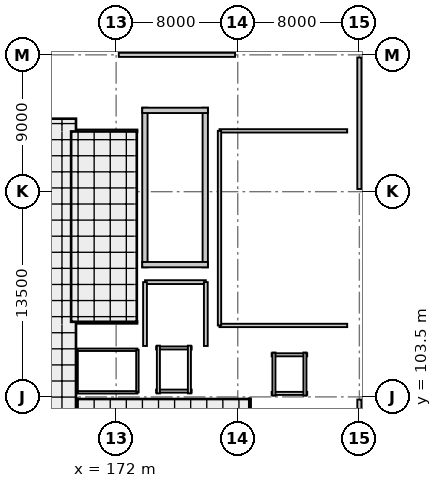
"""IFC4 building model, lengths in metres.
Left out: names, types, materials, properties, quantities, classifications, styles, units other than length and angle.
Written with IfcOpenShell. Run it as: python <this file> out.ifc"""

import sys

from ifc_helpers import new_model, si_unit, direction, frame, frame_2d, origin, origin_2d, place, context, subcontext, project, spatial, rectangle, i_section, extrude, element, fill, save


model = new_model("IFC4")
c1 = context("Model", 3, precision=1e-05, world=origin(), true_north=direction((0.0, 1.0)))
c2 = subcontext(c1, "Body", "Model", "MODEL_VIEW")
j1 = project(units=[si_unit("LENGTHUNIT", "METRE"), si_unit("PLANEANGLEUNIT", "RADIAN")], contexts=[c1])
p1 = place(None, origin())
s1 = spatial("IfcSite", under=j1, at=p1, CompositionType="ELEMENT")
p2 = place(p1, origin())
s2 = spatial("IfcBuilding", under=s1, at=p2, CompositionType="ELEMENT")
p3 = place(p2, frame((0.0, 0.0, 17.6)))
s3 = spatial("IfcBuildingStorey", under=s2, at=p3, CompositionType="ELEMENT", Elevation=17.6)
for number, where, z_axis, x_axis in (
    (1, (172.0, 103.5, 0.0), (0.0, 0.0, 1.0), (1.0, 0.0, 0.0)),
    (2, (172.0, 117.0, 0.0), (0.0, 0.0, 1.0), (1.0, 0.0, 0.0)),
    (3, (172.0, 126.0, 0.0), (0.0, 0.0, 1.0), (1.0, 0.0, 0.0)),
    (4, (180.0, 103.5, 0.0), (0.0, 0.0, 1.0), (1.0, 0.0, 0.0)),
    (5, (180.0, 117.0, 0.0), (0.0, 0.0, 1.0), (1.0, 0.0, 0.0)),
    (6, (180.0, 126.0, 0.0), (0.0, 0.0, 1.0), (1.0, 0.0, 0.0)),
    (7, (188.0, 103.5, 0.0), (0.0, 0.0, 1.0), (1.0, 0.0, 0.0)),
    (8, (188.0, 117.0, 0.0), (0.0, 0.0, 1.0), (1.0, 0.0, 0.0)),
    (9, (188.0, 126.0, 0.0), (0.0, 0.0, 1.0), (1.0, 0.0, 0.0)),
):
    element("IfcColumn", number, at=place(p3, frame(where, z_axis=z_axis, x_axis=x_axis)), inside=s3, PredefinedType="COLUMN", context=c2, shape_type="SweptSolid", body=[
        extrude(i_section(OverallWidth=0.35, OverallDepth=0.35, WebThickness=0.012, FlangeThickness=0.019, FilletRadius=0.02, at=origin_2d()), origin(), (0.0, 0.0, 1.0), 3.2),
    ])
p4 = place(p3, frame((172.175, 126.0, 0.0), z_axis=(0.0, 0.0, 1.0), x_axis=(1.0, 0.0, 0.0)))
e10 = element("IfcWall", 10, at=p4, inside=s3, PredefinedType="SOLIDWALL", context=c2, shape_type="SweptSolid", body=[
    extrude(rectangle(XDim=7.65, YDim=0.27, at=frame_2d((3.825, 0.0))), origin(), (0.0, 0.0, 1.0), 2.495),
])
p5 = place(p4, frame((3.25, 0.0, 0.9)))
e11 = element("IfcOpeningElement", 11, at=p5, cuts=e10, PredefinedType="OPENING", context=c2, shape_type="SweptSolid", body=[
    extrude(rectangle(XDim=1.15, YDim=1.45, at=frame_2d((0.575, 0.725))), frame((0.0, 0.145, 0.0), z_axis=(0.0, -1.0, 0.0), x_axis=(1.0, 0.0, 0.0)), (0.0, 0.0, 1.0), 0.29),
])
for number, where, z_axis, x_axis in (
    (12, (188.0, 103.325, 0.0), (0.0, 0.0, 1.0), (0.0, -1.0, 0.0)),
    (13, (188.0, 125.825, 0.0), (0.0, 0.0, 1.0), (0.0, -1.0, 0.0)),
):
    element("IfcWall", number, at=place(p3, frame(where, z_axis=z_axis, x_axis=x_axis)), inside=s3, PredefinedType="SOLIDWALL", context=c2, shape_type="SweptSolid", body=[
        extrude(rectangle(XDim=8.65, YDim=0.27, at=frame_2d((4.325, 0.0))), origin(), (0.0, 0.0, 1.0), 2.375),
    ])
for number, where, z_axis, x_axis in (
    (14, (177.863, 112.025, 0.0), (0.0, 0.0, 1.0), (0.0, 1.0, 0.0)),
    (15, (173.893, 122.522, 0.0), (0.0, 0.0, 1.0), (0.0, -1.0, 0.0)),
):
    element("IfcWall", number, at=place(p3, frame(where, z_axis=z_axis, x_axis=x_axis)), inside=s3, PredefinedType="SHEAR", context=c2, shape_type="SweptSolid", body=[
        extrude(rectangle(XDim=10.498, YDim=0.35, at=frame_2d((5.249, 0.0))), origin(), (0.0, 0.0, 1.0), 2.98),
    ])
p6 = place(p3, frame((178.038, 122.347, 0.0), z_axis=(0.0, 0.0, 1.0), x_axis=(-1.0, 0.0, 0.0)))
e16 = element("IfcWall", 16, at=p6, inside=s3, PredefinedType="SHEAR", context=c2, shape_type="SweptSolid", body=[
    extrude(rectangle(XDim=4.32, YDim=0.35, at=frame_2d((2.16, 0.0))), origin(), (0.0, 0.0, 1.0), 2.98),
])
p7 = place(p3, frame((173.718, 112.2, 0.0), z_axis=(0.0, 0.0, 1.0), x_axis=(1.0, 0.0, 0.0)))
e17 = element("IfcWall", 17, at=p7, inside=s3, PredefinedType="SHEAR", context=c2, shape_type="SweptSolid", body=[
    extrude(rectangle(XDim=4.32, YDim=0.35, at=frame_2d((2.16, 0.0))), origin(), (0.0, 0.0, 1.0), 2.98),
])
p8 = place(p7, frame((1.15, 0.0, 0.0)))
e18 = element("IfcOpeningElement", 18, at=p8, cuts=e17, PredefinedType="OPENING", context=c2, shape_type="SweptSolid", body=[
    extrude(rectangle(XDim=1.3, YDim=2.1, at=frame_2d((0.65, 1.05))), frame((0.0, 0.185, 0.0), z_axis=(0.0, -1.0, 0.0), x_axis=(1.0, 0.0, 0.0)), (0.0, 0.0, 1.0), 0.37),
])
p9 = place(p3, frame((174.63, 103.88, 0.0), z_axis=(0.0, 0.0, 1.0), x_axis=(1.0, 0.0, 0.0)))
e19 = element("IfcWall", 19, at=p9, inside=s3, PredefinedType="SOLIDWALL", context=c2, shape_type="SweptSolid", body=[
    extrude(rectangle(XDim=2.34, YDim=0.2, at=frame_2d((1.17, 0.0))), origin(), (0.0, 0.0, 1.0), 2.515),
])
p10 = place(p3, frame((176.97, 106.72, 0.0), z_axis=(0.0, 0.0, 1.0), x_axis=(-1.0, 0.0, 0.0)))
e20 = element("IfcWall", 20, at=p10, inside=s3, PredefinedType="SOLIDWALL", context=c2, shape_type="SweptSolid", body=[
    extrude(rectangle(XDim=2.34, YDim=0.2, at=frame_2d((1.17, 0.0))), origin(), (0.0, 0.0, 1.0), 2.955),
])
p11 = place(p10, frame((0.57, 0.0, 0.0)))
e21 = element("IfcOpeningElement", 21, at=p11, cuts=e20, PredefinedType="OPENING", context=c2, shape_type="SweptSolid", body=[
    extrude(rectangle(XDim=1.2, YDim=2.15, at=frame_2d((0.6, 1.075))), frame((0.0, 0.11, 0.0), z_axis=(0.0, -1.0, 0.0), x_axis=(1.0, 0.0, 0.0)), (0.0, 0.0, 1.0), 0.22),
])
for number, where, z_axis, x_axis in (
    (22, (174.78, 106.87, 0.0), (0.0, 0.0, 1.0), (0.0, -1.0, 0.0)),
    (23, (176.82, 103.73, 0.0), (0.0, 0.0, 1.0), (0.0, 1.0, 0.0)),
):
    element("IfcWall", number, at=place(p3, frame(where, z_axis=z_axis, x_axis=x_axis)), inside=s3, PredefinedType="SOLIDWALL", context=c2, shape_type="SweptSolid", body=[
        extrude(rectangle(XDim=3.14, YDim=0.2, at=frame_2d((1.57, 0.0))), origin(), (0.0, 0.0, 1.0), 2.515),
    ])
p12 = place(p3, frame((182.23, 103.73, 0.0), z_axis=(0.0, 0.0, 1.0), x_axis=(1.0, 0.0, 0.0)))
e24 = element("IfcWall", 24, at=p12, inside=s3, PredefinedType="SOLIDWALL", context=c2, shape_type="SweptSolid", body=[
    extrude(rectangle(XDim=2.34, YDim=0.2, at=frame_2d((1.17, 0.0))), origin(), (0.0, 0.0, 1.0), 2.515),
])
p13 = place(p12, frame((0.62, 0.0, 0.0)))
e25 = element("IfcOpeningElement", 25, at=p13, cuts=e24, PredefinedType="OPENING", context=c2, shape_type="SweptSolid", body=[
    extrude(rectangle(XDim=1.1, YDim=2.15, at=frame_2d((0.55, 1.075))), frame((0.0, 0.11, 0.0), z_axis=(0.0, -1.0, 0.0), x_axis=(1.0, 0.0, 0.0)), (0.0, 0.0, 1.0), 0.22),
])
p14 = place(p3, frame((184.57, 106.27, 0.0), z_axis=(0.0, 0.0, 1.0), x_axis=(-1.0, 0.0, 0.0)))
e26 = element("IfcWall", 26, at=p14, inside=s3, PredefinedType="SOLIDWALL", context=c2, shape_type="SweptSolid", body=[
    extrude(rectangle(XDim=2.34, YDim=0.2, at=frame_2d((1.17, 0.0))), origin(), (0.0, 0.0, 1.0), 2.955),
])
for number, where, z_axis, x_axis in (
    (27, (182.38, 106.42, 0.0), (0.0, 0.0, 1.0), (0.0, -1.0, 0.0)),
    (28, (184.42, 103.58, 0.0), (0.0, 0.0, 1.0), (0.0, 1.0, 0.0)),
):
    element("IfcWall", number, at=place(p3, frame(where, z_axis=z_axis, x_axis=x_axis)), inside=s3, PredefinedType="SOLIDWALL", context=c2, shape_type="SweptSolid", body=[
        extrude(rectangle(XDim=2.84, YDim=0.2, at=frame_2d((1.42, 0.0))), origin(), (0.0, 0.0, 1.0), 2.515),
    ])
p15 = place(p3, frame((169.4, 100.2, 0.0), z_axis=(0.0, 0.0, 1.0), x_axis=(0.0, 1.0, 0.0)))
e29 = element("IfcWall", 29, at=p15, inside=s3, PredefinedType="PARTITIONING", context=c2, shape_type="SweptSolid", body=[
    extrude(rectangle(XDim=3.2, YDim=0.14, at=frame_2d((1.6, 0.0))), origin(), (0.0, 0.0, 1.0), 2.515),
])
p16 = place(p15, frame((1.075, 0.0, 0.0)))
e30 = element("IfcOpeningElement", 30, at=p16, cuts=e29, PredefinedType="OPENING", context=c2, shape_type="SweptSolid", body=[
    extrude(rectangle(XDim=1.05, YDim=2.1, at=frame_2d((0.525, 1.05))), frame((0.0, 0.08, 0.0), z_axis=(0.0, -1.0, 0.0), x_axis=(1.0, 0.0, 0.0)), (0.0, 0.0, 1.0), 0.16),
])
p17 = place(p3, frame((180.8, 103.4, 0.0), z_axis=(0.0, 0.0, 1.0), x_axis=(0.0, -1.0, 0.0)))
e31 = element("IfcWall", 31, at=p17, inside=s3, PredefinedType="PARTITIONING", context=c2, shape_type="SweptSolid", body=[
    extrude(rectangle(XDim=3.2, YDim=0.14, at=frame_2d((1.6, 0.0))), origin(), (0.0, 0.0, 1.0), 2.355),
])
for number, where, z_axis, x_axis in (
    (32, (173.4, 103.8, 0.0), (0.0, 0.0, 1.0), (-1.0, 0.0, 0.0)),
    (33, (169.4, 106.6, 0.0), (0.0, 0.0, 1.0), (1.0, 0.0, 0.0)),
):
    element("IfcWall", number, at=place(p3, frame(where, z_axis=z_axis, x_axis=x_axis)), inside=s3, PredefinedType="PARTITIONING", context=c2, shape_type="SweptSolid", body=[
        extrude(rectangle(XDim=4.0, YDim=0.16, at=frame_2d((2.0, 0.0))), origin(), (0.0, 0.0, 1.0), 2.355),
    ])
p18 = place(p3, frame((169.4, 103.8, 0.0), z_axis=(0.0, 0.0, 1.0), x_axis=(0.0, 1.0, 0.0)))
e34 = element("IfcWall", 34, at=p18, inside=s3, PredefinedType="PARTITIONING", context=c2, shape_type="SweptSolid", body=[
    extrude(rectangle(XDim=2.8, YDim=0.16, at=frame_2d((1.4, 0.0))), origin(), (0.0, 0.0, 1.0), 2.515),
])
p19 = place(p18, frame((0.875, 0.0, 0.0)))
e35 = element("IfcOpeningElement", 35, at=p19, cuts=e34, PredefinedType="OPENING", context=c2, shape_type="SweptSolid", body=[
    extrude(rectangle(XDim=1.05, YDim=2.1, at=frame_2d((0.525, 1.05))), frame((0.0, 0.09, 0.0), z_axis=(0.0, -1.0, 0.0), x_axis=(1.0, 0.0, 0.0)), (0.0, 0.0, 1.0), 0.18),
])
p20 = place(p3, frame((173.4, 106.6, 0.0), z_axis=(0.0, 0.0, 1.0), x_axis=(0.0, -1.0, 0.0)))
e36 = element("IfcWall", 36, at=p20, inside=s3, PredefinedType="PARTITIONING", context=c2, shape_type="SweptSolid", body=[
    extrude(rectangle(XDim=2.8, YDim=0.16, at=frame_2d((1.4, 0.0))), origin(), (0.0, 0.0, 1.0), 2.515),
])
p21 = place(p3, frame((187.2, 108.2, 0.0), z_axis=(0.0, 0.0, 1.0), x_axis=(-1.0, 0.0, 0.0)))
e37 = element("IfcWall", 37, at=p21, inside=s3, PredefinedType="SOLIDWALL", context=c2, shape_type="SweptSolid", body=[
    extrude(rectangle(XDim=8.4, YDim=0.22, at=frame_2d((4.2, 0.0))), origin(), (0.0, 0.0, 1.0), 2.355),
])
p22 = place(p3, frame((178.8, 121.0, 0.0), z_axis=(0.0, 0.0, 1.0), x_axis=(1.0, 0.0, 0.0)))
e38 = element("IfcWall", 38, at=p22, inside=s3, PredefinedType="SOLIDWALL", context=c2, shape_type="SweptSolid", body=[
    extrude(rectangle(XDim=8.4, YDim=0.22, at=frame_2d((4.2, 0.0))), origin(), (0.0, 0.0, 1.0), 2.495),
])
p23 = place(p22, frame((3.6, 0.0, 0.0)))
e39 = element("IfcOpeningElement", 39, at=p23, cuts=e38, PredefinedType="OPENING", context=c2, shape_type="SweptSolid", body=[
    extrude(rectangle(XDim=1.2, YDim=2.1, at=frame_2d((0.6, 1.05))), frame((0.0, 0.12, 0.0), z_axis=(0.0, -1.0, 0.0), x_axis=(1.0, 0.0, 0.0)), (0.0, 0.0, 1.0), 0.24),
])
p24 = place(p3, frame((178.8, 108.2, 0.0), z_axis=(0.0, 0.0, 1.0), x_axis=(0.0, 1.0, 0.0)))
e40 = element("IfcWall", 40, at=p24, inside=s3, PredefinedType="SOLIDWALL", context=c2, shape_type="SweptSolid", body=[
    extrude(rectangle(XDim=12.8, YDim=0.22, at=frame_2d((6.4, 0.0))), origin(), (0.0, 0.0, 1.0), 2.955),
])
p25 = place(p3, frame((173.4, 108.4, 0.0), z_axis=(0.0, 0.0, 1.0), x_axis=(-1.0, 0.0, 0.0)))
e41 = element("IfcWall", 41, at=p25, inside=s3, PredefinedType="PARTITIONING", context=c2, shape_type="SweptSolid", body=[
    extrude(rectangle(XDim=4.4, YDim=0.175, at=frame_2d((2.2, 0.0))), origin(), (0.0, 0.0, 1.0), 2.355),
])
p26 = place(p3, frame((169.0, 121.0, 0.0), z_axis=(0.0, 0.0, 1.0), x_axis=(1.0, 0.0, 0.0)))
e42 = element("IfcWall", 42, at=p26, inside=s3, PredefinedType="PARTITIONING", context=c2, shape_type="SweptSolid", body=[
    extrude(rectangle(XDim=4.4, YDim=0.175, at=frame_2d((2.2, 0.0))), origin(), (0.0, 0.0, 1.0), 2.565),
])
p27 = place(p26, frame((1.625, 0.0, 0.0)))
e43 = element("IfcOpeningElement", 43, at=p27, cuts=e42, PredefinedType="OPENING", context=c2, shape_type="SweptSolid", body=[
    extrude(rectangle(XDim=1.15, YDim=2.1, at=frame_2d((0.575, 1.05))), frame((0.0, 0.097, 0.0), z_axis=(0.0, -1.0, 0.0), x_axis=(1.0, 0.0, 0.0)), (0.0, 0.0, 1.0), 0.195),
])
p28 = place(p3, frame((169.0, 108.4, 0.0), z_axis=(0.0, 0.0, 1.0), x_axis=(0.0, 1.0, 0.0)))
e44 = element("IfcWall", 44, at=p28, inside=s3, PredefinedType="PARTITIONING", context=c2, shape_type="SweptSolid", body=[
    extrude(rectangle(XDim=12.6, YDim=0.175, at=frame_2d((6.3, 0.0))), origin(), (0.0, 0.0, 1.0), 2.515),
])
p29 = place(p3, frame((173.9, 111.05, 0.0), z_axis=(0.0, 0.0, 1.0), x_axis=(1.0, 0.0, 0.0)))
e45 = element("IfcWall", 45, at=p29, inside=s3, PredefinedType="SOLIDWALL", context=c2, shape_type="SweptSolid", body=[
    extrude(rectangle(XDim=4.0, YDim=0.25, at=frame_2d((2.0, 0.0))), origin(), (0.0, 0.0, 1.0), 2.955),
])
p30 = place(p3, frame((173.9, 106.85, 0.0), z_axis=(0.0, 0.0, 1.0), x_axis=(0.0, 1.0, 0.0)))
e46 = element("IfcWall", 46, at=p30, inside=s3, PredefinedType="SOLIDWALL", context=c2, shape_type="SweptSolid", body=[
    extrude(rectangle(XDim=4.2, YDim=0.25, at=frame_2d((2.1, 0.0))), origin(), (0.0, 0.0, 1.0), 2.955),
])
p31 = place(p30, frame((1.4, 0.0, 0.0)))
e47 = element("IfcOpeningElement", 47, at=p31, cuts=e46, PredefinedType="OPENING", context=c2, shape_type="SweptSolid", body=[
    extrude(rectangle(XDim=1.4, YDim=2.1, at=frame_2d((0.7, 1.05))), frame((0.0, 0.135, 0.0), z_axis=(0.0, -1.0, 0.0), x_axis=(1.0, 0.0, 0.0)), (0.0, 0.0, 1.0), 0.27),
])
p32 = place(p3, frame((177.9, 111.05, 0.0), z_axis=(0.0, 0.0, 1.0), x_axis=(0.0, -1.0, 0.0)))
e48 = element("IfcWall", 48, at=p32, inside=s3, PredefinedType="SOLIDWALL", context=c2, shape_type="SweptSolid", body=[
    extrude(rectangle(XDim=4.2, YDim=0.25, at=frame_2d((2.1, 0.0))), origin(), (0.0, 0.0, 1.0), 2.955),
])
p33 = place(p5, origin())
e49 = element("IfcWindow", 49, at=p33, inside=s3, PartitioningType="SINGLE_PANEL", PredefinedType="WINDOW", context=c2, shape_type="SweptSolid", body=[
    extrude(rectangle(XDim=1.15, YDim=1.45, at=frame_2d((0.575, 0.725))), frame((0.0, 0.03, 0.0), z_axis=(0.0, -1.0, 0.0), x_axis=(1.0, 0.0, 0.0)), (0.0, 0.0, 1.0), 0.06),
])
fill(e11, e49)
p34 = place(p8, origin())
e50 = element("IfcDoor", 50, at=p34, inside=s3, OperationType="SINGLE_SWING_LEFT", PredefinedType="DOOR", context=c2, shape_type="SweptSolid", body=[
    extrude(rectangle(XDim=1.3, YDim=2.1, at=frame_2d((0.65, 1.05))), frame((0.0, 0.025, 0.0), z_axis=(0.0, -1.0, 0.0), x_axis=(1.0, 0.0, 0.0)), (0.0, 0.0, 1.0), 0.05),
])
fill(e18, e50)
p35 = place(p11, origin())
e51 = element("IfcDoor", 51, at=p35, inside=s3, OperationType="SLIDING_TO_LEFT", PredefinedType="DOOR", context=c2, shape_type="SweptSolid", body=[
    extrude(rectangle(XDim=1.2, YDim=2.15, at=frame_2d((0.6, 1.075))), frame((0.0, 0.025, 0.0), z_axis=(0.0, -1.0, 0.0), x_axis=(1.0, 0.0, 0.0)), (0.0, 0.0, 1.0), 0.05),
])
fill(e21, e51)
p36 = place(p13, origin())
e52 = element("IfcDoor", 52, at=p36, inside=s3, OperationType="SLIDING_TO_LEFT", PredefinedType="DOOR", context=c2, shape_type="SweptSolid", body=[
    extrude(rectangle(XDim=1.1, YDim=2.15, at=frame_2d((0.55, 1.075))), frame((0.0, 0.025, 0.0), z_axis=(0.0, -1.0, 0.0), x_axis=(1.0, 0.0, 0.0)), (0.0, 0.0, 1.0), 0.05),
])
fill(e25, e52)
p37 = place(p19, origin())
e53 = element("IfcDoor", 53, at=p37, inside=s3, OperationType="SINGLE_SWING_RIGHT", PredefinedType="DOOR", context=c2, shape_type="SweptSolid", body=[
    extrude(rectangle(XDim=1.05, YDim=2.1, at=frame_2d((0.525, 1.05))), frame((0.0, 0.025, 0.0), z_axis=(0.0, -1.0, 0.0), x_axis=(1.0, 0.0, 0.0)), (0.0, 0.0, 1.0), 0.05),
])
fill(e35, e53)
p38 = place(p23, origin())
e54 = element("IfcDoor", 54, at=p38, inside=s3, OperationType="SINGLE_SWING_RIGHT", PredefinedType="DOOR", context=c2, shape_type="SweptSolid", body=[
    extrude(rectangle(XDim=1.2, YDim=2.1, at=frame_2d((0.6, 1.05))), frame((0.0, 0.025, 0.0), z_axis=(0.0, -1.0, 0.0), x_axis=(1.0, 0.0, 0.0)), (0.0, 0.0, 1.0), 0.05),
])
fill(e39, e54)
p39 = place(p27, origin())
e55 = element("IfcDoor", 55, at=p39, inside=s3, OperationType="SINGLE_SWING_LEFT", PredefinedType="DOOR", context=c2, shape_type="SweptSolid", body=[
    extrude(rectangle(XDim=1.15, YDim=2.1, at=frame_2d((0.575, 1.05))), frame((0.0, 0.025, 0.0), z_axis=(0.0, -1.0, 0.0), x_axis=(1.0, 0.0, 0.0)), (0.0, 0.0, 1.0), 0.05),
])
fill(e43, e55)
p40 = place(p31, origin())
e56 = element("IfcDoor", 56, at=p40, inside=s3, OperationType="SINGLE_SWING_RIGHT", PredefinedType="DOOR", context=c2, shape_type="SweptSolid", body=[
    extrude(rectangle(XDim=1.4, YDim=2.1, at=frame_2d((0.7, 1.05))), frame((0.0, 0.025, 0.0), z_axis=(0.0, -1.0, 0.0), x_axis=(1.0, 0.0, 0.0)), (0.0, 0.0, 1.0), 0.05),
])
fill(e47, e56)
save(model, sys.argv[1])
